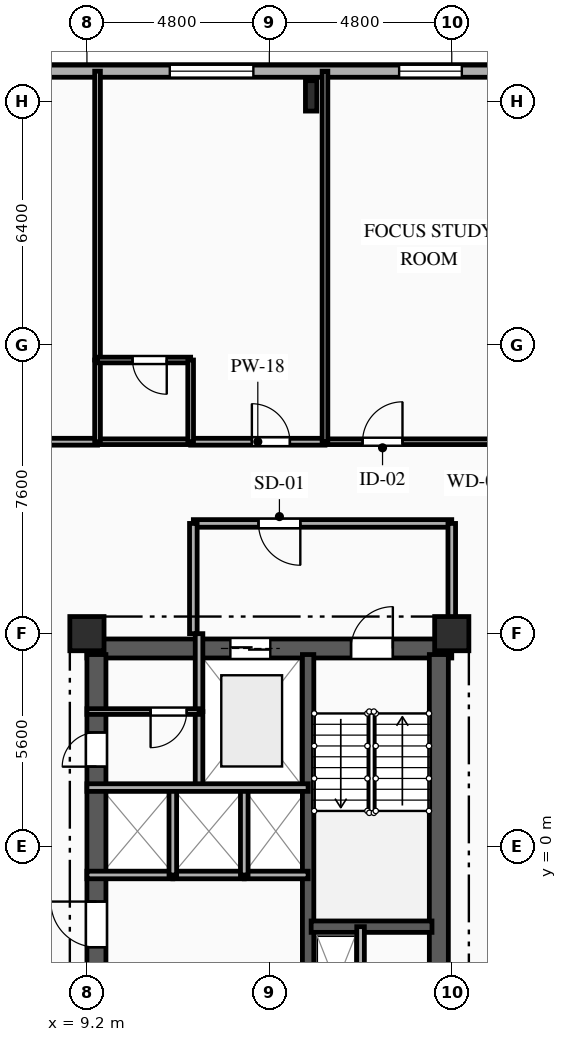
"""IFC4 building model, lengths in metres.
Left out: names, types, materials, properties, quantities, classifications, styles, units other than length and angle.
Written with IfcOpenShell. Run it as: python <this file> out.ifc"""

import sys

from ifc_helpers import new_model, si_unit, direction, frame, frame_2d, origin, origin_2d, place, context, subcontext, project, spatial, rectangle, i_section, extrude, element, fill, save


model = new_model("IFC4")
c1 = context("Model", 3, precision=1e-05, world=origin(), true_north=direction((0.0, 1.0)))
c2 = subcontext(c1, "Body", "Model", "MODEL_VIEW")
j1 = project(units=[si_unit("LENGTHUNIT", "METRE"), si_unit("PLANEANGLEUNIT", "RADIAN")], contexts=[c1])
p1 = place(None, origin())
s1 = spatial("IfcSite", under=j1, at=p1, CompositionType="ELEMENT")
p2 = place(p1, origin())
s2 = spatial("IfcBuilding", under=s1, at=p2, CompositionType="ELEMENT")
p3 = place(p2, frame((0.0, 0.0, 134.35)))
s3 = spatial("IfcBuildingStorey", under=s2, at=p3, CompositionType="ELEMENT", Elevation=134.35)
for number, where, z_axis, x_axis in (
    (1, (9.2, 5.6, 0.0), (0.0, 0.0, 1.0), (1.0, 0.0, 0.0)),
    (2, (18.8, 5.6, 0.0), (0.0, 0.0, 1.0), (1.0, 0.0, 0.0)),
):
    element("IfcColumn", number, at=place(p3, frame(where, z_axis=z_axis, x_axis=x_axis)), inside=s3, PredefinedType="COLUMN", context=c2, shape_type="SweptSolid", body=[
        extrude(rectangle(XDim=0.9, YDim=0.9, at=origin_2d()), origin(), (0.0, 0.0, 1.0), 3.35),
    ])
p4 = place(p3, frame((15.1, 19.75, 0.0), z_axis=(0.0, 0.0, 1.0), x_axis=(1.0, 0.0, 0.0)))
e3 = element("IfcColumn", 3, at=p4, inside=s3, PredefinedType="COLUMN", context=c2, shape_type="SweptSolid", body=[
    extrude(i_section(OverallWidth=0.3, OverallDepth=0.8, WebThickness=0.018, FlangeThickness=0.033, FilletRadius=0.03, at=origin_2d()), origin(), (0.0, 0.0, 1.0), 3.35),
])
p5 = place(p3, frame((-25.8, 20.4, 0.0), z_axis=(0.0, 0.0, 1.0), x_axis=(1.0, 0.0, 0.0)))
e4 = element("IfcWall", 4, at=p5, inside=s3, PredefinedType="SOLIDWALL", context=c2, shape_type="SweptSolid", body=[
    extrude(rectangle(XDim=49.6, YDim=0.32, at=frame_2d((24.8, 0.0))), origin(), (0.0, 0.0, 1.0), 3.04),
])
p6 = place(p5, frame((2.135, 0.0, 0.85)))
e5 = element("IfcOpeningElement", 5, at=p6, cuts=e4, PredefinedType="OPENING", context=c2, shape_type="SweptSolid", body=[
    extrude(rectangle(XDim=1.65, YDim=1.85, at=frame_2d((0.825, 0.925))), frame((0.0, 0.17, 0.0), z_axis=(0.0, -1.0, 0.0), x_axis=(1.0, 0.0, 0.0)), (0.0, 0.0, 1.0), 0.34),
])
p7 = place(p5, frame((6.706, 0.0, 0.85)))
e6 = element("IfcOpeningElement", 6, at=p7, cuts=e4, PredefinedType="OPENING", context=c2, shape_type="SweptSolid", body=[
    extrude(rectangle(XDim=1.65, YDim=1.85, at=frame_2d((0.825, 0.925))), frame((0.0, 0.17, 0.0), z_axis=(0.0, -1.0, 0.0), x_axis=(1.0, 0.0, 0.0)), (0.0, 0.0, 1.0), 0.34),
])
p8 = place(p5, frame((14.76, 0.0, 0.85)))
e7 = element("IfcOpeningElement", 7, at=p8, cuts=e4, PredefinedType="OPENING", context=c2, shape_type="SweptSolid", body=[
    extrude(rectangle(XDim=1.6, YDim=1.85, at=frame_2d((0.8, 0.925))), frame((0.0, 0.17, 0.0), z_axis=(0.0, -1.0, 0.0), x_axis=(1.0, 0.0, 0.0)), (0.0, 0.0, 1.0), 0.34),
])
p9 = place(p5, frame((19.26, 0.0, 0.85)))
e8 = element("IfcOpeningElement", 8, at=p9, cuts=e4, PredefinedType="OPENING", context=c2, shape_type="SweptSolid", body=[
    extrude(rectangle(XDim=2.2, YDim=1.85, at=frame_2d((1.1, 0.925))), frame((0.0, 0.17, 0.0), z_axis=(0.0, -1.0, 0.0), x_axis=(1.0, 0.0, 0.0)), (0.0, 0.0, 1.0), 0.34),
])
p10 = place(p5, frame((25.26, 0.0, 0.85)))
e9 = element("IfcOpeningElement", 9, at=p10, cuts=e4, PredefinedType="OPENING", context=c2, shape_type="SweptSolid", body=[
    extrude(rectangle(XDim=2.2, YDim=1.85, at=frame_2d((1.1, 0.925))), frame((0.0, 0.17, 0.0), z_axis=(0.0, -1.0, 0.0), x_axis=(1.0, 0.0, 0.0)), (0.0, 0.0, 1.0), 0.34),
])
p11 = place(p5, frame((30.4, 0.0, 0.85)))
e10 = element("IfcOpeningElement", 10, at=p11, cuts=e4, PredefinedType="OPENING", context=c2, shape_type="SweptSolid", body=[
    extrude(rectangle(XDim=2.2, YDim=1.85, at=frame_2d((1.1, 0.925))), frame((0.0, 0.17, 0.0), z_axis=(0.0, -1.0, 0.0), x_axis=(1.0, 0.0, 0.0)), (0.0, 0.0, 1.0), 0.34),
])
p12 = place(p5, frame((37.18, 0.0, 0.85)))
e11 = element("IfcOpeningElement", 11, at=p12, cuts=e4, PredefinedType="OPENING", context=c2, shape_type="SweptSolid", body=[
    extrude(rectangle(XDim=2.2, YDim=1.85, at=frame_2d((1.1, 0.925))), frame((0.0, 0.17, 0.0), z_axis=(0.0, -1.0, 0.0), x_axis=(1.0, 0.0, 0.0)), (0.0, 0.0, 1.0), 0.34),
])
p13 = place(p5, frame((43.215, 0.0, 0.85)))
e12 = element("IfcOpeningElement", 12, at=p13, cuts=e4, PredefinedType="OPENING", context=c2, shape_type="SweptSolid", body=[
    extrude(rectangle(XDim=1.65, YDim=1.85, at=frame_2d((0.825, 0.925))), frame((0.0, 0.17, 0.0), z_axis=(0.0, -1.0, 0.0), x_axis=(1.0, 0.0, 0.0)), (0.0, 0.0, 1.0), 0.34),
])
p14 = place(p5, frame((47.45, 0.0, 0.85)))
e13 = element("IfcOpeningElement", 13, at=p14, cuts=e4, PredefinedType="OPENING", context=c2, shape_type="SweptSolid", body=[
    extrude(rectangle(XDim=1.1, YDim=1.85, at=frame_2d((0.55, 0.925))), frame((0.0, 0.17, 0.0), z_axis=(0.0, -1.0, 0.0), x_axis=(1.0, 0.0, 0.0)), (0.0, 0.0, 1.0), 0.34),
])
p15 = place(p3, frame((9.2, 5.21, 0.0), z_axis=(0.0, 0.0, 1.0), x_axis=(1.0, 0.0, 0.0)))
e14 = element("IfcWall", 14, at=p15, inside=s3, PredefinedType="SHEAR", context=c2, shape_type="SweptSolid", body=[
    extrude(rectangle(XDim=9.6, YDim=0.5, at=frame_2d((4.8, 0.0))), origin(), (0.0, 0.0, 1.0), 3.04),
])
p16 = place(p15, frame((6.95, 0.0, 0.0)))
e15 = element("IfcOpeningElement", 15, at=p16, cuts=e14, PredefinedType="OPENING", context=c2, shape_type="SweptSolid", body=[
    extrude(rectangle(XDim=1.1, YDim=2.15, at=frame_2d((0.55, 1.075))), frame((0.0, 0.26, 0.0), z_axis=(0.0, -1.0, 0.0), x_axis=(1.0, 0.0, 0.0)), (0.0, 0.0, 1.0), 0.52),
])
p17 = place(p15, frame((3.775, 0.0, 0.0)))
e16 = element("IfcOpeningElement", 16, at=p17, cuts=e14, PredefinedType="OPENING", context=c2, shape_type="SweptSolid", body=[
    extrude(rectangle(XDim=1.05, YDim=2.1, at=frame_2d((0.525, 1.05))), frame((0.0, 0.26, 0.0), z_axis=(0.0, -1.0, 0.0), x_axis=(1.0, 0.0, 0.0)), (0.0, 0.0, 1.0), 0.52),
])
p18 = place(p3, frame((9.45, -5.05, 0.0), z_axis=(0.0, 0.0, 1.0), x_axis=(0.0, 1.0, 0.0)))
e17 = element("IfcWall", 17, at=p18, inside=s3, PredefinedType="SHEAR", context=c2, shape_type="SweptSolid", body=[
    extrude(rectangle(XDim=10.1, YDim=0.5, at=frame_2d((5.05, 0.0))), origin(), (0.0, 0.0, 1.0), 3.04),
])
p19 = place(p18, frame((7.15, 0.0, 0.0)))
e18 = element("IfcOpeningElement", 18, at=p19, cuts=e17, PredefinedType="OPENING", context=c2, shape_type="SweptSolid", body=[
    extrude(rectangle(XDim=0.9, YDim=2.1, at=frame_2d((0.45, 1.05))), frame((0.0, 0.26, 0.0), z_axis=(0.0, -1.0, 0.0), x_axis=(1.0, 0.0, 0.0)), (0.0, 0.0, 1.0), 0.52),
])
p20 = place(p18, frame((2.4, 0.0, 0.0)))
e19 = element("IfcOpeningElement", 19, at=p20, cuts=e17, PredefinedType="OPENING", context=c2, shape_type="SweptSolid", body=[
    extrude(rectangle(XDim=1.2, YDim=2.15, at=frame_2d((0.6, 1.075))), frame((0.0, 0.26, 0.0), z_axis=(0.0, -1.0, 0.0), x_axis=(1.0, 0.0, 0.0)), (0.0, 0.0, 1.0), 0.52),
])
p21 = place(p3, frame((18.46, -5.05, 0.0), z_axis=(0.0, 0.0, 1.0), x_axis=(0.0, 1.0, 0.0)))
e20 = element("IfcWall", 20, at=p21, inside=s3, PredefinedType="SHEAR", context=c2, shape_type="SweptSolid", body=[
    extrude(rectangle(XDim=10.1, YDim=0.5, at=frame_2d((5.05, 0.0))), origin(), (0.0, 0.0, 1.0), 3.04),
])
p22 = place(p3, frame((15.02, -5.05, 0.0), z_axis=(0.0, 0.0, 1.0), x_axis=(0.0, 1.0, 0.0)))
e21 = element("IfcWall", 21, at=p22, inside=s3, PredefinedType="SHEAR", context=c2, shape_type="SweptSolid", body=[
    extrude(rectangle(XDim=10.1, YDim=0.3, at=frame_2d((5.05, 0.0))), origin(), (0.0, 0.0, 1.0), 3.04),
])
p23 = place(p3, frame((15.1, -2.11, 0.0), z_axis=(0.0, 0.0, 1.0), x_axis=(1.0, 0.0, 0.0)))
e22 = element("IfcWall", 22, at=p23, inside=s3, PredefinedType="SHEAR", context=c2, shape_type="SweptSolid", body=[
    extrude(rectangle(XDim=3.18, YDim=0.3, at=frame_2d((1.59, 0.0))), origin(), (0.0, 0.0, 1.0), 3.04),
])
p24 = place(p3, frame((16.4, -2.11, 0.0), z_axis=(0.0, 0.0, 1.0), x_axis=(0.0, -1.0, 0.0)))
e23 = element("IfcWall", 23, at=p24, inside=s3, PredefinedType="PARTITIONING", context=c2, shape_type="SweptSolid", body=[
    extrude(rectangle(XDim=3.49, YDim=0.2, at=frame_2d((1.745, 0.0))), origin(), (0.0, 0.0, 1.0), 3.04),
])
p25 = place(p3, frame((12.15, 3.55, 0.0), z_axis=(0.0, 0.0, 1.0), x_axis=(0.0, -1.0, 0.0)))
e24 = element("IfcWall", 24, at=p25, inside=s3, PredefinedType="PARTITIONING", context=c2, shape_type="SweptSolid", body=[
    extrude(rectangle(XDim=2.0, YDim=0.2, at=frame_2d((1.0, 0.0))), origin(), (0.0, 0.0, 1.0), 3.04),
])
p26 = place(p3, frame((12.15, 5.6, 0.0), z_axis=(0.0, 0.0, 1.0), x_axis=(0.0, -1.0, 0.0)))
e25 = element("IfcWall", 25, at=p26, inside=s3, PredefinedType="PARTITIONING", context=c2, shape_type="SweptSolid", body=[
    extrude(rectangle(XDim=2.05, YDim=0.2, at=frame_2d((1.025, 0.0))), origin(), (0.0, 0.0, 1.0), 3.04),
])
p27 = place(p3, frame((18.8, 8.5, 0.0), z_axis=(0.0, 0.0, 1.0), x_axis=(-1.0, 0.0, 0.0)))
e26 = element("IfcWall", 26, at=p27, inside=s3, PredefinedType="PARTITIONING", context=c2, shape_type="SweptSolid", body=[
    extrude(rectangle(XDim=6.8, YDim=0.2, at=frame_2d((3.4, 0.0))), origin(), (0.0, 0.0, 1.0), 3.04),
])
p28 = place(p27, frame((3.985, 0.0, 0.0)))
e27 = element("IfcOpeningElement", 27, at=p28, cuts=e26, PredefinedType="OPENING", context=c2, shape_type="SweptSolid", body=[
    extrude(rectangle(XDim=1.1, YDim=2.15, at=frame_2d((0.55, 1.075))), frame((0.0, 0.11, 0.0), z_axis=(0.0, -1.0, 0.0), x_axis=(1.0, 0.0, 0.0)), (0.0, 0.0, 1.0), 0.22),
])
p29 = place(p3, frame((18.8, 5.6, 0.0), z_axis=(0.0, 0.0, 1.0), x_axis=(0.0, 1.0, 0.0)))
e28 = element("IfcWall", 28, at=p29, inside=s3, PredefinedType="PARTITIONING", context=c2, shape_type="SweptSolid", body=[
    extrude(rectangle(XDim=2.9, YDim=0.2, at=frame_2d((1.45, 0.0))), origin(), (0.0, 0.0, 1.0), 2.525),
])
p30 = place(p3, frame((12.0, 8.5, 0.0), z_axis=(0.0, 0.0, 1.0), x_axis=(0.0, -1.0, 0.0)))
e29 = element("IfcWall", 29, at=p30, inside=s3, PredefinedType="PARTITIONING", context=c2, shape_type="SweptSolid", body=[
    extrude(rectangle(XDim=2.9, YDim=0.2, at=frame_2d((1.45, 0.0))), origin(), (0.0, 0.0, 1.0), 3.04),
])
p31 = place(p3, frame((12.15, 3.55, 0.0), z_axis=(0.0, 0.0, 1.0), x_axis=(-1.0, 0.0, 0.0)))
e30 = element("IfcWall", 30, at=p31, inside=s3, PredefinedType="PARTITIONING", context=c2, shape_type="SweptSolid", body=[
    extrude(rectangle(XDim=2.95, YDim=0.15, at=frame_2d((1.475, 0.0))), origin(), (0.0, 0.0, 1.0), 3.04),
])
p32 = place(p31, frame((0.325, 0.0, 0.0)))
e31 = element("IfcOpeningElement", 31, at=p32, cuts=e30, PredefinedType="OPENING", context=c2, shape_type="SweptSolid", body=[
    extrude(rectangle(XDim=0.95, YDim=2.1, at=frame_2d((0.475, 1.05))), frame((0.0, 0.085, 0.0), z_axis=(0.0, -1.0, 0.0), x_axis=(1.0, 0.0, 0.0)), (0.0, 0.0, 1.0), 0.17),
])
p33 = place(p3, frame((11.46, -0.75, 0.0), z_axis=(0.0, 0.0, 1.0), x_axis=(-1.0, 0.0, 0.0)))
e32 = element("IfcWall", 32, at=p33, inside=s3, PredefinedType="PARTITIONING", context=c2, shape_type="SweptSolid", body=[
    extrude(rectangle(XDim=2.26, YDim=0.2, at=frame_2d((1.13, 0.0))), origin(), (0.0, 0.0, 1.0), 3.04),
])
p34 = place(p3, frame((13.34, -0.75, 0.0), z_axis=(0.0, 0.0, 1.0), x_axis=(-1.0, 0.0, 0.0)))
e33 = element("IfcWall", 33, at=p34, inside=s3, PredefinedType="PARTITIONING", context=c2, shape_type="SweptSolid", body=[
    extrude(rectangle(XDim=1.88, YDim=0.2, at=frame_2d((0.94, 0.0))), origin(), (0.0, 0.0, 1.0), 3.04),
])
p35 = place(p3, frame((15.02, -0.75, 0.0), z_axis=(0.0, 0.0, 1.0), x_axis=(-1.0, 0.0, 0.0)))
e34 = element("IfcWall", 34, at=p35, inside=s3, PredefinedType="PARTITIONING", context=c2, shape_type="SweptSolid", body=[
    extrude(rectangle(XDim=1.68, YDim=0.2, at=frame_2d((0.84, 0.0))), origin(), (0.0, 0.0, 1.0), 3.04),
])
for number, where, z_axis, x_axis in (
    (35, (11.46, -0.75, 0.0), (0.0, 0.0, 1.0), (0.0, 1.0, 0.0)),
    (36, (13.34, -0.75, 0.0), (0.0, 0.0, 1.0), (0.0, 1.0, 0.0)),
):
    element("IfcWall", number, at=place(p3, frame(where, z_axis=z_axis, x_axis=x_axis)), inside=s3, PredefinedType="PARTITIONING", context=c2, shape_type="SweptSolid", body=[
        extrude(rectangle(XDim=2.3, YDim=0.2, at=frame_2d((1.15, 0.0))), origin(), (0.0, 0.0, 1.0), 3.04),
    ])
p36 = place(p3, frame((5.943, 10.65, 0.0), z_axis=(0.0, 0.0, 1.0), x_axis=(1.0, 0.0, 0.0)))
e37 = element("IfcWall", 37, at=p36, inside=s3, PredefinedType="PARTITIONING", context=c2, shape_type="SweptSolid", body=[
    extrude(rectangle(XDim=3.536, YDim=0.18, at=frame_2d((1.768, 0.0))), origin(), (0.0, 0.0, 1.0), 3.04),
])
p37 = place(p36, frame((0.752, 0.0, 0.0)))
e38 = element("IfcOpeningElement", 38, at=p37, cuts=e37, PredefinedType="OPENING", context=c2, shape_type="SweptSolid", body=[
    extrude(rectangle(XDim=1.0, YDim=2.15, at=frame_2d((0.5, 1.075))), frame((0.0, 0.1, 0.0), z_axis=(0.0, -1.0, 0.0), x_axis=(1.0, 0.0, 0.0)), (0.0, 0.0, 1.0), 0.2),
])
p38 = place(p3, frame((11.929, 10.65, 0.0), z_axis=(0.0, 0.0, 1.0), x_axis=(1.0, 0.0, 0.0)))
e39 = element("IfcWall", 39, at=p38, inside=s3, PredefinedType="PARTITIONING", context=c2, shape_type="SweptSolid", body=[
    extrude(rectangle(XDim=3.535, YDim=0.18, at=frame_2d((1.768, 0.0))), origin(), (0.0, 0.0, 1.0), 3.04),
])
p39 = place(p38, frame((1.611, 0.0, 0.0)))
e40 = element("IfcOpeningElement", 40, at=p39, cuts=e39, PredefinedType="OPENING", context=c2, shape_type="SweptSolid", body=[
    extrude(rectangle(XDim=1.0, YDim=2.15, at=frame_2d((0.5, 1.075))), frame((0.0, 0.1, 0.0), z_axis=(0.0, -1.0, 0.0), x_axis=(1.0, 0.0, 0.0)), (0.0, 0.0, 1.0), 0.2),
])
p40 = place(p3, frame((9.479, 10.65, 0.0), z_axis=(0.0, 0.0, 1.0), x_axis=(1.0, 0.0, 0.0)))
e41 = element("IfcWall", 41, at=p40, inside=s3, PredefinedType="PLUMBINGWALL", context=c2, shape_type="SweptSolid", body=[
    extrude(rectangle(XDim=2.45, YDim=0.15, at=frame_2d((1.225, 0.0))), origin(), (0.0, 0.0, 1.0), 3.04),
])
p41 = place(p3, frame((15.464, 10.65, 0.0), z_axis=(0.0, 0.0, 1.0), x_axis=(1.0, 0.0, 0.0)))
e42 = element("IfcWall", 42, at=p41, inside=s3, PredefinedType="PARTITIONING", context=c2, shape_type="SweptSolid", body=[
    extrude(rectangle(XDim=5.486, YDim=0.15, at=frame_2d((2.743, 0.0))), origin(), (0.0, 0.0, 1.0), 3.04),
])
p42 = place(p41, frame((0.99, 0.0, 0.0)))
e43 = element("IfcOpeningElement", 43, at=p42, cuts=e42, PredefinedType="OPENING", context=c2, shape_type="SweptSolid", body=[
    extrude(rectangle(XDim=1.05, YDim=2.15, at=frame_2d((0.525, 1.075))), frame((0.0, 0.085, 0.0), z_axis=(0.0, -1.0, 0.0), x_axis=(1.0, 0.0, 0.0)), (0.0, 0.0, 1.0), 0.17),
])
p43 = place(p3, frame((9.479, 20.4, 0.0), z_axis=(0.0, 0.0, 1.0), x_axis=(0.0, -1.0, 0.0)))
e44 = element("IfcWall", 44, at=p43, inside=s3, PredefinedType="PARTITIONING", context=c2, shape_type="SweptSolid", body=[
    extrude(rectangle(XDim=7.6, YDim=0.15, at=frame_2d((3.8, 0.0))), origin(), (0.0, 0.0, 1.0), 3.04),
])
p44 = place(p3, frame((9.479, 12.8, 0.0), z_axis=(0.0, 0.0, 1.0), x_axis=(0.0, -1.0, 0.0)))
e45 = element("IfcWall", 45, at=p44, inside=s3, PredefinedType="PLUMBINGWALL", context=c2, shape_type="SweptSolid", body=[
    extrude(rectangle(XDim=2.15, YDim=0.15, at=frame_2d((1.075, 0.0))), origin(), (0.0, 0.0, 1.0), 3.04),
])
p45 = place(p3, frame((11.929, 12.8, 0.0), z_axis=(0.0, 0.0, 1.0), x_axis=(-1.0, 0.0, 0.0)))
e46 = element("IfcWall", 46, at=p45, inside=s3, PredefinedType="PLUMBINGWALL", context=c2, shape_type="SweptSolid", body=[
    extrude(rectangle(XDim=2.45, YDim=0.15, at=frame_2d((1.225, 0.0))), origin(), (0.0, 0.0, 1.0), 3.04),
])
p46 = place(p45, frame((0.629, 0.0, 0.0)))
e47 = element("IfcOpeningElement", 47, at=p46, cuts=e46, PredefinedType="OPENING", context=c2, shape_type="SweptSolid", body=[
    extrude(rectangle(XDim=0.9, YDim=2.1, at=frame_2d((0.45, 1.05))), frame((0.0, 0.085, 0.0), z_axis=(0.0, -1.0, 0.0), x_axis=(1.0, 0.0, 0.0)), (0.0, 0.0, 1.0), 0.17),
])
p47 = place(p3, frame((11.929, 10.65, 0.0), z_axis=(0.0, 0.0, 1.0), x_axis=(0.0, 1.0, 0.0)))
e48 = element("IfcWall", 48, at=p47, inside=s3, PredefinedType="PLUMBINGWALL", context=c2, shape_type="SweptSolid", body=[
    extrude(rectangle(XDim=2.15, YDim=0.15, at=frame_2d((1.075, 0.0))), origin(), (0.0, 0.0, 1.0), 3.04),
])
p48 = place(p3, frame((15.464, 20.4, 0.0), z_axis=(0.0, 0.0, 1.0), x_axis=(0.0, -1.0, 0.0)))
e49 = element("IfcWall", 49, at=p48, inside=s3, PredefinedType="PARTITIONING", context=c2, shape_type="SweptSolid", body=[
    extrude(rectangle(XDim=9.75, YDim=0.15, at=frame_2d((4.875, 0.0))), origin(), (0.0, 0.0, 1.0), 2.525),
])
p49 = place(p3, frame((9.2, 1.55, 0.0), z_axis=(0.0, 0.0, 1.0), x_axis=(1.0, 0.0, 0.0)))
e50 = element("IfcWall", 50, at=p49, inside=s3, PredefinedType="PARTITIONING", context=c2, shape_type="SweptSolid", body=[
    extrude(rectangle(XDim=5.82, YDim=0.2, at=frame_2d((2.91, 0.0))), origin(), (0.0, 0.0, 1.0), 3.04),
])
p50 = place(p12, origin())
e51 = element("IfcWindow", 51, at=p50, inside=s3, PartitioningType="SINGLE_PANEL", PredefinedType="WINDOW", context=c2, shape_type="SweptSolid", body=[
    extrude(rectangle(XDim=2.2, YDim=1.85, at=frame_2d((1.1, 0.925))), frame((0.0, 0.03, 0.0), z_axis=(0.0, -1.0, 0.0), x_axis=(1.0, 0.0, 0.0)), (0.0, 0.0, 1.0), 0.06),
])
fill(e11, e51)
p51 = place(p13, origin())
e52 = element("IfcWindow", 52, at=p51, inside=s3, PartitioningType="SINGLE_PANEL", PredefinedType="WINDOW", context=c2, shape_type="SweptSolid", body=[
    extrude(rectangle(XDim=1.65, YDim=1.85, at=frame_2d((0.825, 0.925))), frame((0.0, 0.03, 0.0), z_axis=(0.0, -1.0, 0.0), x_axis=(1.0, 0.0, 0.0)), (0.0, 0.0, 1.0), 0.06),
])
fill(e12, e52)
p52 = place(p16, origin())
e53 = element("IfcDoor", 53, at=p52, inside=s3, OperationType="SINGLE_SWING_RIGHT", PredefinedType="DOOR", context=c2, shape_type="SweptSolid", body=[
    extrude(rectangle(XDim=1.1, YDim=2.15, at=frame_2d((0.55, 1.075))), frame((0.0, 0.025, 0.0), z_axis=(0.0, -1.0, 0.0), x_axis=(1.0, 0.0, 0.0)), (0.0, 0.0, 1.0), 0.05),
])
fill(e15, e53)
p53 = place(p17, origin())
e54 = element("IfcDoor", 54, at=p53, inside=s3, OperationType="DOUBLE_DOOR_SLIDING", PredefinedType="DOOR", context=c2, shape_type="SweptSolid", body=[
    extrude(rectangle(XDim=1.05, YDim=2.1, at=frame_2d((0.525, 1.05))), frame((0.0, 0.025, 0.0), z_axis=(0.0, -1.0, 0.0), x_axis=(1.0, 0.0, 0.0)), (0.0, 0.0, 1.0), 0.05),
])
fill(e16, e54)
p54 = place(p28, origin())
e55 = element("IfcDoor", 55, at=p54, inside=s3, OperationType="SINGLE_SWING_LEFT", PredefinedType="DOOR", context=c2, shape_type="SweptSolid", body=[
    extrude(rectangle(XDim=1.1, YDim=2.15, at=frame_2d((0.55, 1.075))), frame((0.0, 0.025, 0.0), z_axis=(0.0, -1.0, 0.0), x_axis=(1.0, 0.0, 0.0)), (0.0, 0.0, 1.0), 0.05),
])
fill(e27, e55)
p55 = place(p32, origin())
e56 = element("IfcDoor", 56, at=p55, inside=s3, OperationType="SINGLE_SWING_RIGHT", PredefinedType="DOOR", context=c2, shape_type="SweptSolid", body=[
    extrude(rectangle(XDim=0.95, YDim=2.1, at=frame_2d((0.475, 1.05))), frame((0.0, 0.025, 0.0), z_axis=(0.0, -1.0, 0.0), x_axis=(1.0, 0.0, 0.0)), (0.0, 0.0, 1.0), 0.05),
])
fill(e31, e56)
p56 = place(p19, origin())
e57 = element("IfcDoor", 57, at=p56, inside=s3, OperationType="SINGLE_SWING_LEFT", PredefinedType="DOOR", context=c2, shape_type="SweptSolid", body=[
    extrude(rectangle(XDim=0.9, YDim=2.1, at=frame_2d((0.45, 1.05))), frame((0.0, 0.025, 0.0), z_axis=(0.0, -1.0, 0.0), x_axis=(1.0, 0.0, 0.0)), (0.0, 0.0, 1.0), 0.05),
])
fill(e18, e57)
p57 = place(p20, origin())
e58 = element("IfcDoor", 58, at=p57, inside=s3, OperationType="SINGLE_SWING_RIGHT", PredefinedType="DOOR", context=c2, shape_type="SweptSolid", body=[
    extrude(rectangle(XDim=1.2, YDim=2.15, at=frame_2d((0.6, 1.075))), frame((0.0, 0.025, 0.0), z_axis=(0.0, -1.0, 0.0), x_axis=(1.0, 0.0, 0.0)), (0.0, 0.0, 1.0), 0.05),
])
fill(e19, e58)
p58 = place(p39, origin())
e59 = element("IfcDoor", 59, at=p58, inside=s3, OperationType="SINGLE_SWING_LEFT", PredefinedType="DOOR", context=c2, shape_type="SweptSolid", body=[
    extrude(rectangle(XDim=1.0, YDim=2.15, at=frame_2d((0.5, 1.075))), frame((0.0, 0.025, 0.0), z_axis=(0.0, -1.0, 0.0), x_axis=(1.0, 0.0, 0.0)), (0.0, 0.0, 1.0), 0.05),
])
fill(e40, e59)
p59 = place(p42, origin())
e60 = element("IfcDoor", 60, at=p59, inside=s3, OperationType="SINGLE_SWING_RIGHT", PredefinedType="DOOR", context=c2, shape_type="SweptSolid", body=[
    extrude(rectangle(XDim=1.05, YDim=2.15, at=frame_2d((0.525, 1.075))), frame((0.0, 0.025, 0.0), z_axis=(0.0, -1.0, 0.0), x_axis=(1.0, 0.0, 0.0)), (0.0, 0.0, 1.0), 0.05),
])
fill(e43, e60)
p60 = place(p46, origin())
e61 = element("IfcDoor", 61, at=p60, inside=s3, OperationType="SINGLE_SWING_LEFT", PredefinedType="DOOR", context=c2, shape_type="SweptSolid", body=[
    extrude(rectangle(XDim=0.9, YDim=2.1, at=frame_2d((0.45, 1.05))), frame((0.0, 0.025, 0.0), z_axis=(0.0, -1.0, 0.0), x_axis=(1.0, 0.0, 0.0)), (0.0, 0.0, 1.0), 0.05),
])
fill(e47, e61)
save(model, sys.argv[1])
